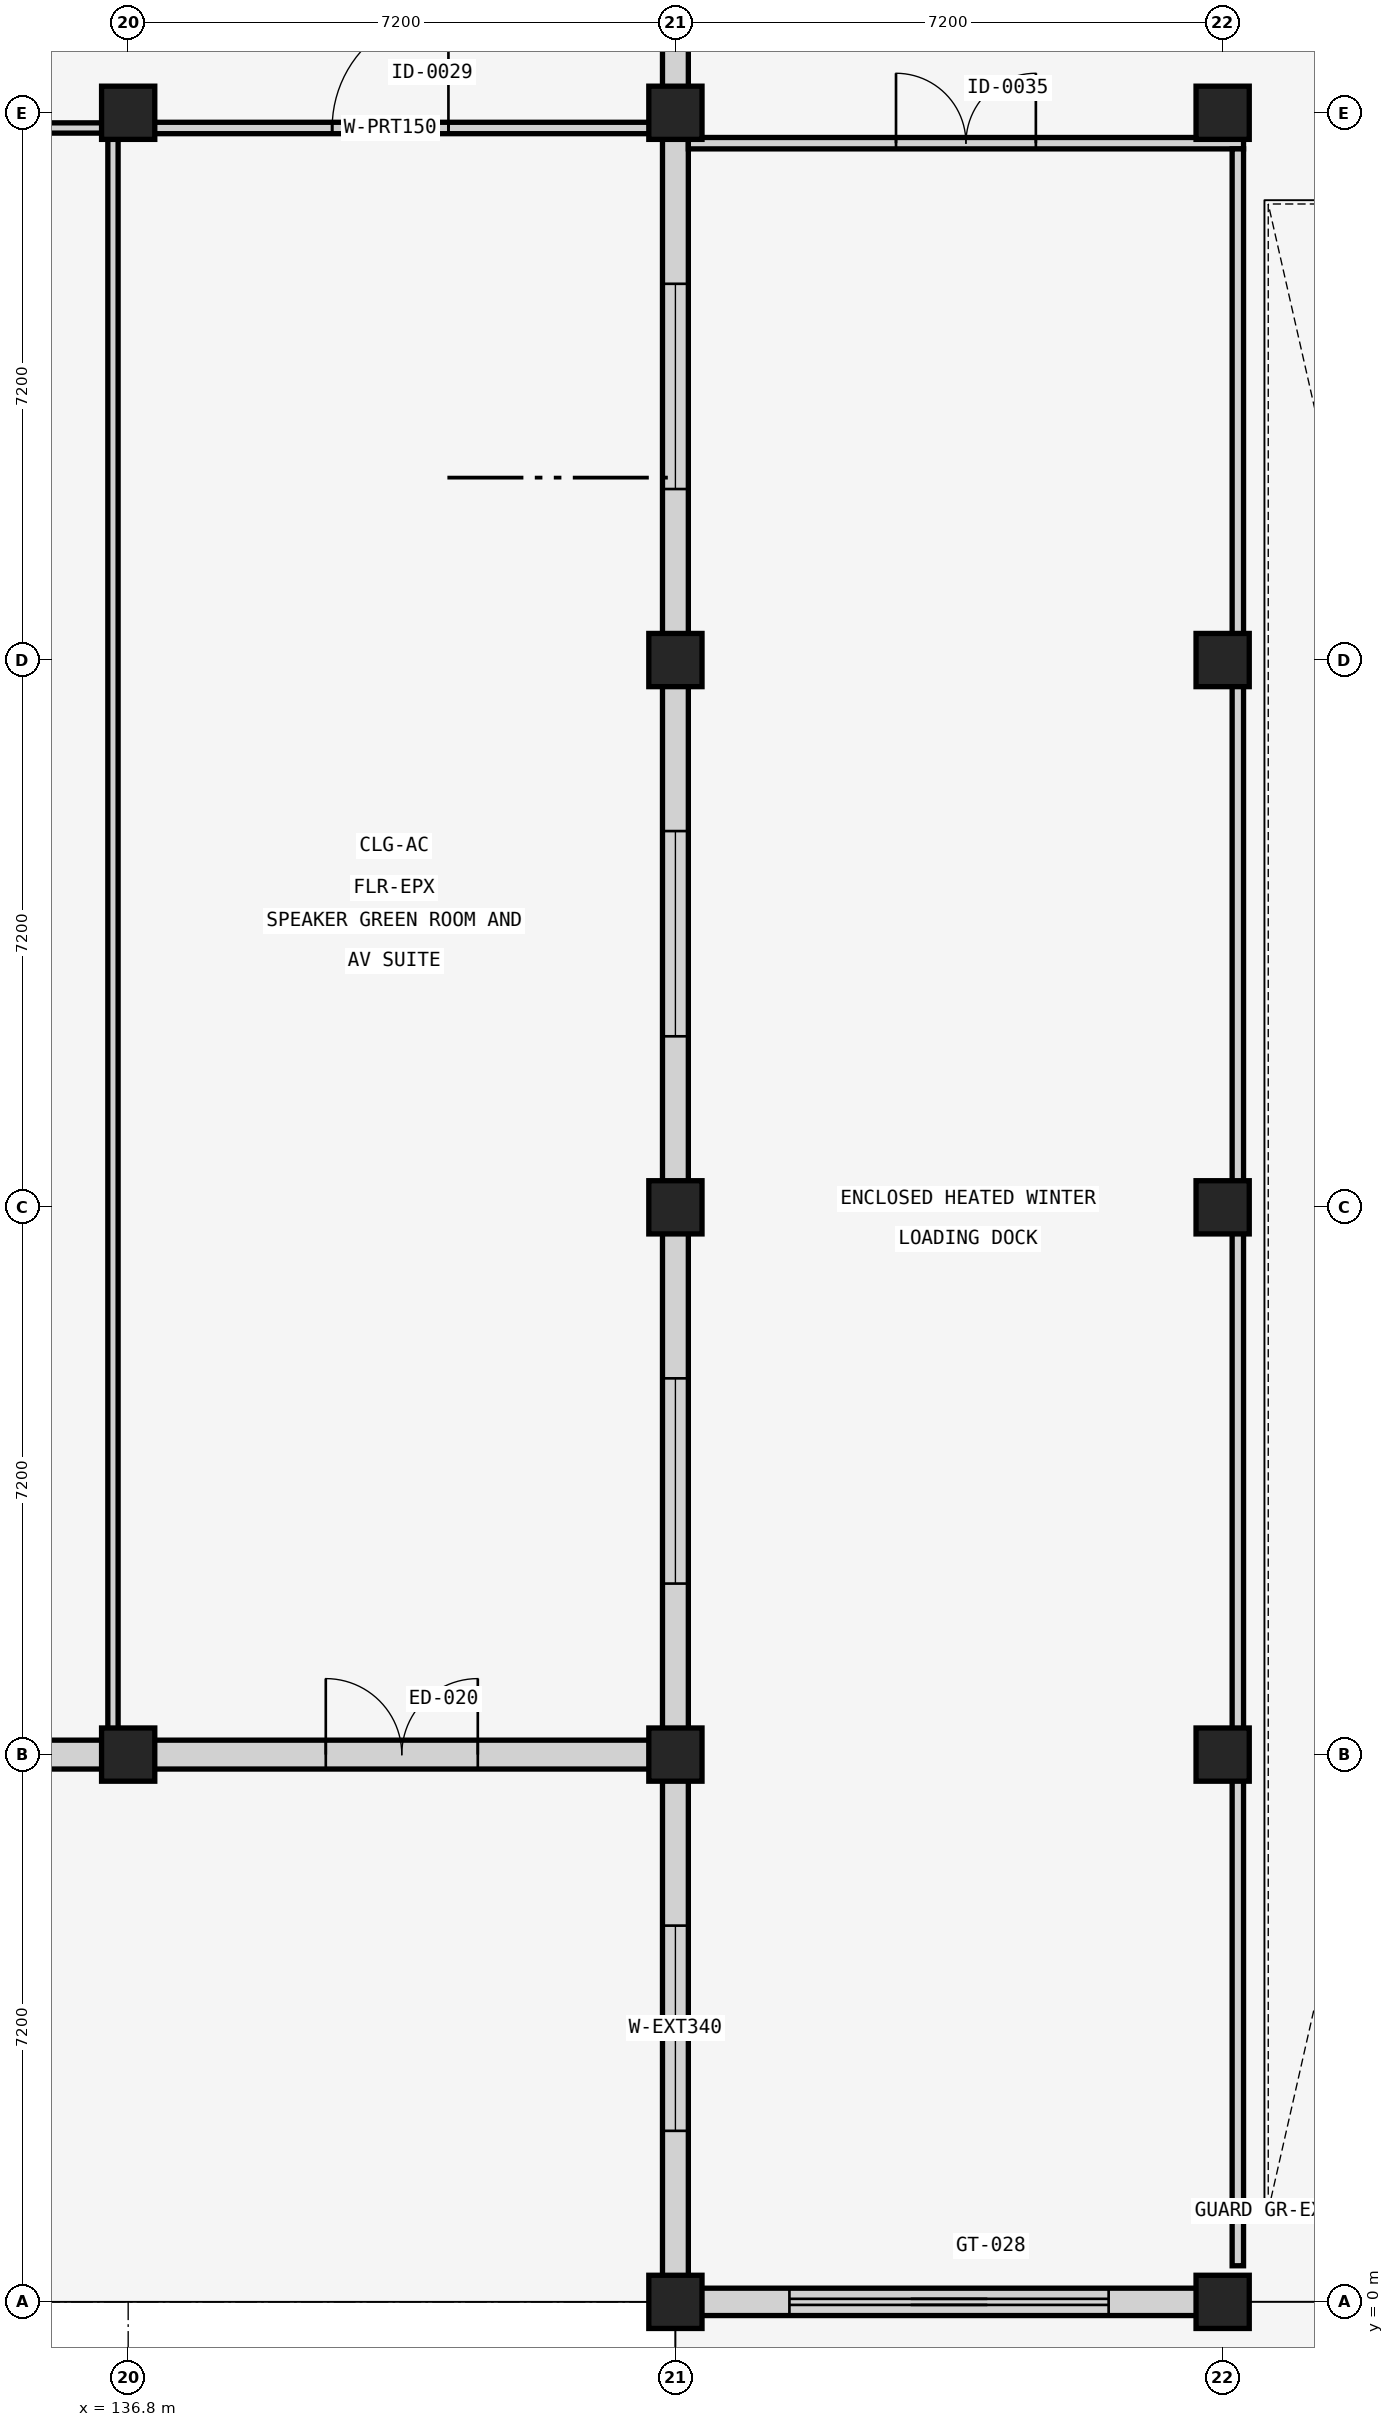
"""IFC4 building model, lengths in metres.
Left out: names, types, materials, properties, quantities, classifications, styles, units other than length and angle.
Written with IfcOpenShell. Run it as: python <this file> out.ifc"""

import sys

from ifc_helpers import new_model, si_unit, direction, frame, frame_2d, origin, origin_2d, place, context, subcontext, project, spatial, rectangle, extrude, element, fill, save


model = new_model("IFC4")
c1 = context("Model", 3, precision=1e-05, world=origin(), true_north=direction((0.0, 1.0)))
c2 = subcontext(c1, "Body", "Model", "MODEL_VIEW")
j1 = project(units=[si_unit("LENGTHUNIT", "METRE"), si_unit("PLANEANGLEUNIT", "RADIAN")], contexts=[c1])
p1 = place(None, origin())
s1 = spatial("IfcSite", under=j1, at=p1, CompositionType="ELEMENT")
p2 = place(p1, origin())
s2 = spatial("IfcBuilding", under=s1, at=p2, CompositionType="ELEMENT")
p3 = place(p2, origin())
s3 = spatial("IfcBuildingStorey", under=s2, at=p3, CompositionType="ELEMENT", Elevation=0.0)
for number, where, z_axis, x_axis in (
    (1, (136.8, 7.2, 0.0), (0.0, 0.0, 1.0), (1.0, 0.0, 0.0)),
    (2, (136.8, 28.8, 0.0), (0.0, 0.0, 1.0), (1.0, 0.0, 0.0)),
    (3, (144.0, 0.0, 0.0), (0.0, 0.0, 1.0), (1.0, 0.0, 0.0)),
    (4, (144.0, 7.2, 0.0), (0.0, 0.0, 1.0), (1.0, 0.0, 0.0)),
    (5, (144.0, 14.4, 0.0), (0.0, 0.0, 1.0), (1.0, 0.0, 0.0)),
    (6, (144.0, 21.6, 0.0), (0.0, 0.0, 1.0), (1.0, 0.0, 0.0)),
    (7, (144.0, 28.8, 0.0), (0.0, 0.0, 1.0), (1.0, 0.0, 0.0)),
    (8, (151.2, 0.0, 0.0), (0.0, 0.0, 1.0), (1.0, 0.0, 0.0)),
    (9, (151.2, 7.2, 0.0), (0.0, 0.0, 1.0), (1.0, 0.0, 0.0)),
    (10, (151.2, 14.4, 0.0), (0.0, 0.0, 1.0), (1.0, 0.0, 0.0)),
    (11, (151.2, 21.6, 0.0), (0.0, 0.0, 1.0), (1.0, 0.0, 0.0)),
    (12, (151.2, 28.8, 0.0), (0.0, 0.0, 1.0), (1.0, 0.0, 0.0)),
):
    element("IfcColumn", number, at=place(p3, frame(where, z_axis=z_axis, x_axis=x_axis)), inside=s3, PredefinedType="COLUMN", context=c2, shape_type="SweptSolid", body=[
        extrude(rectangle(XDim=0.7, YDim=0.7, at=origin_2d()), origin(), (0.0, 0.0, 1.0), 4.8),
    ])
p4 = place(p3, frame((129.94, 7.2, 0.0), z_axis=(0.0, 0.0, 1.0), x_axis=(1.0, 0.0, 0.0)))
e13 = element("IfcWall", 13, at=p4, inside=s3, PredefinedType="SOLIDWALL", context=c2, shape_type="SweptSolid", body=[
    extrude(rectangle(XDim=6.52, YDim=0.38, at=frame_2d((3.26, 0.0))), origin(), (0.0, 0.0, 1.0), 3.85),
])
p5 = place(p4, frame((2.26, 0.0, 0.0)))
e14 = element("IfcOpeningElement", 14, at=p5, cuts=e13, PredefinedType="OPENING", context=c2, shape_type="SweptSolid", body=[
    extrude(rectangle(XDim=2.0, YDim=2.4, at=frame_2d((1.0, 1.2))), frame((0.0, 0.2, 0.0), z_axis=(0.0, -1.0, 0.0), x_axis=(1.0, 0.0, 0.0)), (0.0, 0.0, 1.0), 0.4),
])
p6 = place(p3, frame((137.14, 7.2, 0.0), z_axis=(0.0, 0.0, 1.0), x_axis=(1.0, 0.0, 0.0)))
e15 = element("IfcWall", 15, at=p6, inside=s3, PredefinedType="SOLIDWALL", context=c2, shape_type="SweptSolid", body=[
    extrude(rectangle(XDim=6.52, YDim=0.38, at=frame_2d((3.26, 0.0))), origin(), (0.0, 0.0, 1.0), 3.85),
])
p7 = place(p6, frame((2.26, 0.0, 0.0)))
e16 = element("IfcOpeningElement", 16, at=p7, cuts=e15, PredefinedType="OPENING", context=c2, shape_type="SweptSolid", body=[
    extrude(rectangle(XDim=2.0, YDim=2.4, at=frame_2d((1.0, 1.2))), frame((0.0, 0.2, 0.0), z_axis=(0.0, -1.0, 0.0), x_axis=(1.0, 0.0, 0.0)), (0.0, 0.0, 1.0), 0.4),
])
p8 = place(p3, frame((144.34, 0.0, 0.0), z_axis=(0.0, 0.0, 1.0), x_axis=(1.0, 0.0, 0.0)))
e17 = element("IfcWall", 17, at=p8, inside=s3, PredefinedType="SOLIDWALL", context=c2, shape_type="SweptSolid", body=[
    extrude(rectangle(XDim=6.52, YDim=0.36, at=frame_2d((3.26, 0.0))), origin(), (0.0, 0.0, 1.0), 4.45),
])
p9 = place(p8, frame((1.16, 0.0, 0.0)))
e18 = element("IfcOpeningElement", 18, at=p9, cuts=e17, PredefinedType="OPENING", context=c2, shape_type="SweptSolid", body=[
    extrude(rectangle(XDim=4.2, YDim=3.8, at=frame_2d((2.1, 1.9))), frame((0.0, 0.19, 0.0), z_axis=(0.0, -1.0, 0.0), x_axis=(1.0, 0.0, 0.0)), (0.0, 0.0, 1.0), 0.38),
])
p10 = place(p3, frame((144.0, 0.34, 0.0), z_axis=(0.0, 0.0, 1.0), x_axis=(0.0, 1.0, 0.0)))
e19 = element("IfcWall", 19, at=p10, inside=s3, PredefinedType="SOLIDWALL", context=c2, shape_type="SweptSolid", body=[
    extrude(rectangle(XDim=6.52, YDim=0.34, at=frame_2d((3.26, 0.0))), origin(), (0.0, 0.0, 1.0), 4.45),
])
p11 = place(p10, frame((1.91, 0.0, 0.95)))
e20 = element("IfcOpeningElement", 20, at=p11, cuts=e19, PredefinedType="OPENING", context=c2, shape_type="SweptSolid", body=[
    extrude(rectangle(XDim=2.7, YDim=2.1, at=frame_2d((1.35, 1.05))), frame((0.0, 0.18, 0.0), z_axis=(0.0, -1.0, 0.0), x_axis=(1.0, 0.0, 0.0)), (0.0, 0.0, 1.0), 0.36),
])
p12 = place(p3, frame((144.0, 7.54, 0.0), z_axis=(0.0, 0.0, 1.0), x_axis=(0.0, 1.0, 0.0)))
e21 = element("IfcWall", 21, at=p12, inside=s3, PredefinedType="SOLIDWALL", context=c2, shape_type="SweptSolid", body=[
    extrude(rectangle(XDim=6.52, YDim=0.34, at=frame_2d((3.26, 0.0))), origin(), (0.0, 0.0, 1.0), 3.85),
])
p13 = place(p12, frame((1.91, 0.0, 0.95)))
e22 = element("IfcOpeningElement", 22, at=p13, cuts=e21, PredefinedType="OPENING", context=c2, shape_type="SweptSolid", body=[
    extrude(rectangle(XDim=2.7, YDim=2.1, at=frame_2d((1.35, 1.05))), frame((0.0, 0.18, 0.0), z_axis=(0.0, -1.0, 0.0), x_axis=(1.0, 0.0, 0.0)), (0.0, 0.0, 1.0), 0.36),
])
p14 = place(p3, frame((144.0, 14.74, 0.0), z_axis=(0.0, 0.0, 1.0), x_axis=(0.0, 1.0, 0.0)))
e23 = element("IfcWall", 23, at=p14, inside=s3, PredefinedType="SOLIDWALL", context=c2, shape_type="SweptSolid", body=[
    extrude(rectangle(XDim=6.52, YDim=0.34, at=frame_2d((3.26, 0.0))), origin(), (0.0, 0.0, 1.0), 3.85),
])
p15 = place(p14, frame((1.91, 0.0, 0.95)))
e24 = element("IfcOpeningElement", 24, at=p15, cuts=e23, PredefinedType="OPENING", context=c2, shape_type="SweptSolid", body=[
    extrude(rectangle(XDim=2.7, YDim=2.1, at=frame_2d((1.35, 1.05))), frame((0.0, 0.18, 0.0), z_axis=(0.0, -1.0, 0.0), x_axis=(1.0, 0.0, 0.0)), (0.0, 0.0, 1.0), 0.36),
])
p16 = place(p3, frame((144.0, 21.94, 0.0), z_axis=(0.0, 0.0, 1.0), x_axis=(0.0, 1.0, 0.0)))
e25 = element("IfcWall", 25, at=p16, inside=s3, PredefinedType="SOLIDWALL", context=c2, shape_type="SweptSolid", body=[
    extrude(rectangle(XDim=6.52, YDim=0.34, at=frame_2d((3.26, 0.0))), origin(), (0.0, 0.0, 1.0), 3.75),
])
p17 = place(p16, frame((1.91, 0.0, 0.95)))
e26 = element("IfcOpeningElement", 26, at=p17, cuts=e25, PredefinedType="OPENING", context=c2, shape_type="SweptSolid", body=[
    extrude(rectangle(XDim=2.7, YDim=2.1, at=frame_2d((1.35, 1.05))), frame((0.0, 0.18, 0.0), z_axis=(0.0, -1.0, 0.0), x_axis=(1.0, 0.0, 0.0)), (0.0, 0.0, 1.0), 0.36),
])
p18 = place(p3, frame((144.0, 29.14, 0.0), z_axis=(0.0, 0.0, 1.0), x_axis=(0.0, 1.0, 0.0)))
e27 = element("IfcWall", 27, at=p18, inside=s3, PredefinedType="SOLIDWALL", context=c2, shape_type="SweptSolid", body=[
    extrude(rectangle(XDim=6.52, YDim=0.34, at=frame_2d((3.26, 0.0))), origin(), (0.0, 0.0, 1.0), 3.75),
])
p19 = place(p18, frame((1.91, 0.0, 0.95)))
e28 = element("IfcOpeningElement", 28, at=p19, cuts=e27, PredefinedType="OPENING", context=c2, shape_type="SweptSolid", body=[
    extrude(rectangle(XDim=2.7, YDim=2.1, at=frame_2d((1.35, 1.05))), frame((0.0, 0.18, 0.0), z_axis=(0.0, -1.0, 0.0), x_axis=(1.0, 0.0, 0.0)), (0.0, 0.0, 1.0), 0.36),
])
p20 = place(p3, frame((100.98, 28.6, 0.0), z_axis=(0.0, 0.0, 1.0), x_axis=(1.0, 0.0, 0.0)))
e29 = element("IfcWall", 29, at=p20, inside=s3, PredefinedType="PARTITIONING", context=c2, shape_type="SweptSolid", body=[
    extrude(rectangle(XDim=35.688, YDim=0.135, at=frame_2d((17.844, 0.0))), origin(), (0.0, 0.0, 1.0), 3.75),
])
p21 = place(p20, frame((16.919, 0.0, 0.0)))
e30 = element("IfcOpeningElement", 30, at=p21, cuts=e29, PredefinedType="OPENING", context=c2, shape_type="SweptSolid", body=[
    extrude(rectangle(XDim=1.85, YDim=2.3, at=frame_2d((0.925, 1.15))), frame((0.0, 0.078, 0.0), z_axis=(0.0, -1.0, 0.0), x_axis=(1.0, 0.0, 0.0)), (0.0, 0.0, 1.0), 0.155),
])
p22 = place(p3, frame((136.6, 7.39, 0.0), z_axis=(0.0, 0.0, 1.0), x_axis=(0.0, 1.0, 0.0)))
e31 = element("IfcWall", 31, at=p22, inside=s3, PredefinedType="PARTITIONING", context=c2, shape_type="SweptSolid", body=[
    extrude(rectangle(XDim=21.143, YDim=0.135, at=frame_2d((10.571, 0.0))), origin(), (0.0, 0.0, 1.0), 3.75),
])
p23 = place(p3, frame((136.667, 28.6, 0.0), z_axis=(0.0, 0.0, 1.0), x_axis=(1.0, 0.0, 0.0)))
e32 = element("IfcWall", 32, at=p23, inside=s3, PredefinedType="PARTITIONING", context=c2, shape_type="SweptSolid", body=[
    extrude(rectangle(XDim=7.163, YDim=0.15, at=frame_2d((3.581, 0.0))), origin(), (0.0, 0.0, 1.0), 3.75),
])
p24 = place(p23, frame((2.816, 0.0, 0.0)))
e33 = element("IfcOpeningElement", 33, at=p24, cuts=e32, PredefinedType="OPENING", context=c2, shape_type="SweptSolid", body=[
    extrude(rectangle(XDim=1.53, YDim=2.18, at=frame_2d((0.765, 1.09))), frame((0.0, 0.085, 0.0), z_axis=(0.0, -1.0, 0.0), x_axis=(1.0, 0.0, 0.0)), (0.0, 0.0, 1.0), 0.17),
])
p25 = place(p3, frame((144.17, 28.4, 0.0), z_axis=(0.0, 0.0, 1.0), x_axis=(1.0, 0.0, 0.0)))
e34 = element("IfcWall", 34, at=p25, inside=s3, PredefinedType="PARTITIONING", context=c2, shape_type="SweptSolid", body=[
    extrude(rectangle(XDim=7.305, YDim=0.15, at=frame_2d((3.653, 0.0))), origin(), (0.0, 0.0, 1.0), 3.85),
])
p26 = place(p25, frame((2.732, 0.0, 0.0)))
e35 = element("IfcOpeningElement", 35, at=p26, cuts=e34, PredefinedType="OPENING", context=c2, shape_type="SweptSolid", body=[
    extrude(rectangle(XDim=1.84, YDim=2.26, at=frame_2d((0.92, 1.13))), frame((0.0, 0.085, 0.0), z_axis=(0.0, -1.0, 0.0), x_axis=(1.0, 0.0, 0.0)), (0.0, 0.0, 1.0), 0.17),
])
p27 = place(p3, frame((151.4, 0.475, 0.0), z_axis=(0.0, 0.0, 1.0), x_axis=(0.0, 1.0, 0.0)))
e36 = element("IfcWall", 36, at=p27, inside=s3, PredefinedType="PARTITIONING", context=c2, shape_type="SweptSolid", body=[
    extrude(rectangle(XDim=27.85, YDim=0.15, at=frame_2d((13.925, 0.0))), origin(), (0.0, 0.0, 1.0), 4.45),
])
p28 = place(p7, frame((2.0, 0.0, 0.0), z_axis=(0.0, 0.0, 1.0), x_axis=(-1.0, 0.0, 0.0)))
e37 = element("IfcDoor", 37, at=p28, inside=s3, OperationType="DOUBLE_DOOR_SINGLE_SWING", PredefinedType="DOOR", context=c2, shape_type="SweptSolid", body=[
    extrude(rectangle(XDim=2.0, YDim=2.4, at=frame_2d((1.0, 1.2))), frame((0.0, 0.025, 0.0), z_axis=(0.0, -1.0, 0.0), x_axis=(1.0, 0.0, 0.0)), (0.0, 0.0, 1.0), 0.05),
])
fill(e16, e37)
p29 = place(p9, frame((4.2, 0.0, 0.0), z_axis=(0.0, 0.0, 1.0), x_axis=(-1.0, 0.0, 0.0)))
e38 = element("IfcDoor", 38, at=p29, inside=s3, OperationType="ROLLINGUP", PredefinedType="GATE", context=c2, shape_type="SweptSolid", body=[
    extrude(rectangle(XDim=4.2, YDim=3.8, at=frame_2d((2.1, 1.9))), frame((0.0, 0.025, 0.0), z_axis=(0.0, -1.0, 0.0), x_axis=(1.0, 0.0, 0.0)), (0.0, 0.0, 1.0), 0.05),
])
fill(e18, e38)
p30 = place(p11, origin())
e39 = element("IfcWindow", 39, at=p30, inside=s3, PartitioningType="SINGLE_PANEL", PredefinedType="WINDOW", context=c2, shape_type="SweptSolid", body=[
    extrude(rectangle(XDim=2.7, YDim=2.1, at=frame_2d((1.35, 1.05))), frame((0.0, 0.03, 0.0), z_axis=(0.0, -1.0, 0.0), x_axis=(1.0, 0.0, 0.0)), (0.0, 0.0, 1.0), 0.06),
])
fill(e20, e39)
p31 = place(p13, origin())
e40 = element("IfcWindow", 40, at=p31, inside=s3, PartitioningType="SINGLE_PANEL", PredefinedType="WINDOW", context=c2, shape_type="SweptSolid", body=[
    extrude(rectangle(XDim=2.7, YDim=2.1, at=frame_2d((1.35, 1.05))), frame((0.0, 0.03, 0.0), z_axis=(0.0, -1.0, 0.0), x_axis=(1.0, 0.0, 0.0)), (0.0, 0.0, 1.0), 0.06),
])
fill(e22, e40)
p32 = place(p15, origin())
e41 = element("IfcWindow", 41, at=p32, inside=s3, PartitioningType="SINGLE_PANEL", PredefinedType="WINDOW", context=c2, shape_type="SweptSolid", body=[
    extrude(rectangle(XDim=2.7, YDim=2.1, at=frame_2d((1.35, 1.05))), frame((0.0, 0.03, 0.0), z_axis=(0.0, -1.0, 0.0), x_axis=(1.0, 0.0, 0.0)), (0.0, 0.0, 1.0), 0.06),
])
fill(e24, e41)
p33 = place(p17, origin())
e42 = element("IfcWindow", 42, at=p33, inside=s3, PartitioningType="SINGLE_PANEL", PredefinedType="WINDOW", context=c2, shape_type="SweptSolid", body=[
    extrude(rectangle(XDim=2.7, YDim=2.1, at=frame_2d((1.35, 1.05))), frame((0.0, 0.03, 0.0), z_axis=(0.0, -1.0, 0.0), x_axis=(1.0, 0.0, 0.0)), (0.0, 0.0, 1.0), 0.06),
])
fill(e26, e42)
p34 = place(p24, origin())
e43 = element("IfcDoor", 43, at=p34, inside=s3, OperationType="SINGLE_SWING_RIGHT", PredefinedType="DOOR", context=c2, shape_type="SweptSolid", body=[
    extrude(rectangle(XDim=1.53, YDim=2.18, at=frame_2d((0.765, 1.09))), frame((0.0, 0.025, 0.0), z_axis=(0.0, -1.0, 0.0), x_axis=(1.0, 0.0, 0.0)), (0.0, 0.0, 1.0), 0.05),
])
fill(e33, e43)
p35 = place(p26, origin())
e44 = element("IfcDoor", 44, at=p35, inside=s3, OperationType="DOUBLE_DOOR_SINGLE_SWING", PredefinedType="DOOR", context=c2, shape_type="SweptSolid", body=[
    extrude(rectangle(XDim=1.84, YDim=2.26, at=frame_2d((0.92, 1.13))), frame((0.0, 0.025, 0.0), z_axis=(0.0, -1.0, 0.0), x_axis=(1.0, 0.0, 0.0)), (0.0, 0.0, 1.0), 0.05),
])
fill(e35, e44)
save(model, sys.argv[1])
